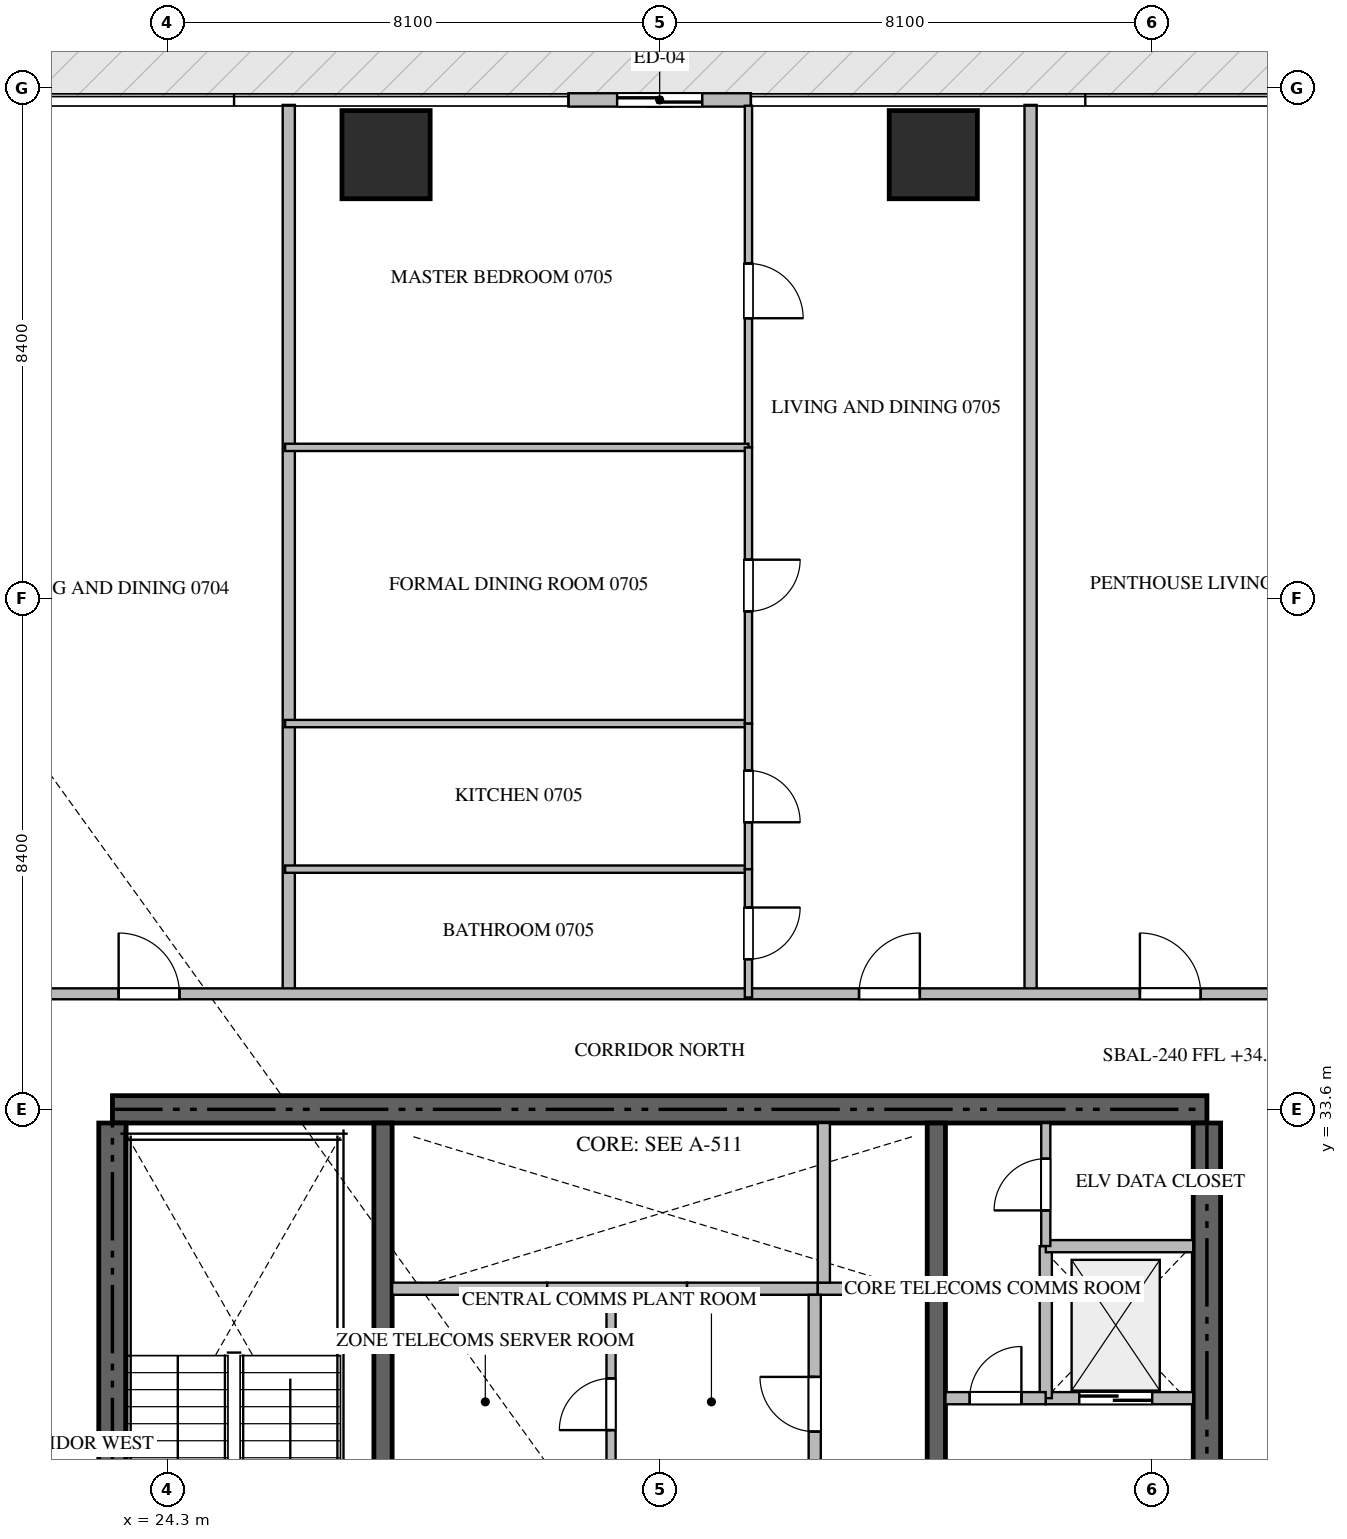
"""IFC4 building model, lengths in metres.
Left out: names, types, materials, properties, quantities, classifications, styles, units other than length and angle.
Written with IfcOpenShell. Run it as: python <this file> out.ifc"""

import sys

from ifc_helpers import new_model, si_unit, direction, frame, frame_2d, origin, origin_2d, place, context, subcontext, project, spatial, rectangle, extrude, source, transform, mapped, element, fill, save


model = new_model("IFC4")
c1 = context("Model", 3, precision=1e-05, world=origin(), true_north=direction((0.0, 1.0)))
c2 = subcontext(c1, "Body", "Model", "MODEL_VIEW")
j1 = project(units=[si_unit("LENGTHUNIT", "METRE"), si_unit("PLANEANGLEUNIT", "RADIAN")], contexts=[c1])
p1 = place(None, origin())
s1 = spatial("IfcSite", under=j1, at=p1, CompositionType="ELEMENT")
p2 = place(p1, origin())
s2 = spatial("IfcBuilding", under=s1, at=p2, CompositionType="ELEMENT")
p3 = place(p2, frame((0.0, 0.0, 34.2)))
s3 = spatial("IfcBuildingStorey", under=s2, at=p3, CompositionType="ELEMENT", Elevation=34.2)
p4 = place(p3, frame((41.4, 33.6, -0.26), z_axis=(0.0, 0.0, 1.0), x_axis=(-1.0, 0.0, 0.0)))
e1 = element("IfcWall", 1, at=p4, inside=s3, PredefinedType="SHEAR", context=c2, shape_type="SweptSolid", body=[
    extrude(rectangle(XDim=18.0, YDim=0.45, at=frame_2d((9.0, 0.0))), origin(), (0.0, 0.0, 1.0), 3.748),
])
p5 = place(p3, frame((23.4, 24.25, -0.26), z_axis=(0.0, 0.0, 1.0), x_axis=(0.0, 1.0, 0.0)))
e2 = element("IfcWall", 2, at=p5, inside=s3, PredefinedType="SHEAR", context=c2, shape_type="SweptSolid", body=[
    extrude(rectangle(XDim=9.125, YDim=0.45, at=frame_2d((4.562, 0.0))), origin(), (0.0, 0.0, 1.0), 3.748),
])
p6 = place(p3, frame((41.4, 27.75, -0.26), z_axis=(0.0, 0.0, 1.0), x_axis=(0.0, 1.0, 0.0)))
e3 = element("IfcWall", 3, at=p6, inside=s3, PredefinedType="SHEAR", context=c2, shape_type="SweptSolid", body=[
    extrude(rectangle(XDim=5.625, YDim=0.45, at=frame_2d((2.812, 0.0))), origin(), (0.0, 0.0, 1.0), 3.748),
])
p7 = place(p3, frame((27.85, 23.55, -0.26), z_axis=(0.0, 0.0, 1.0), x_axis=(0.0, 1.0, 0.0)))
e4 = element("IfcWall", 4, at=p7, inside=s3, PredefinedType="SHEAR", context=c2, shape_type="SweptSolid", body=[
    extrude(rectangle(XDim=9.825, YDim=0.3, at=frame_2d((4.913, 0.0))), origin(), (0.0, 0.0, 1.0), 3.748),
])
p8 = place(p3, frame((36.95, 27.05, -0.26), z_axis=(0.0, 0.0, 1.0), x_axis=(0.0, 1.0, 0.0)))
e5 = element("IfcWall", 5, at=p8, inside=s3, PredefinedType="SHEAR", context=c2, shape_type="SweptSolid", body=[
    extrude(rectangle(XDim=6.325, YDim=0.3, at=frame_2d((3.163, 0.0))), origin(), (0.0, 0.0, 1.0), 3.748),
])
m1 = source(origin(), c2, "Body", "SweptSolid", [
    extrude(rectangle(XDim=1.45, YDim=1.45, at=origin_2d()), origin(), (0.0, 0.0, 1.0), 3.75),
])
for number, where, z_axis, x_axis in (
    (6, (27.9, 49.3, -0.26), (0.0, 0.0, 1.0), (1.0, 0.0, 0.0)),
    (7, (36.9, 49.3, -0.26), (0.0, 0.0, 1.0), (1.0, 0.0, 0.0)),
):
    element("IfcColumn", number, at=place(p3, frame(where, z_axis=z_axis, x_axis=x_axis)), inside=s3, PredefinedType="COLUMN", context=c2, shape_type="MappedRepresentation", body=[
        mapped(m1, transform((0.0, 0.0, 0.0), scale=1.0)),
    ])
p9 = place(p3, frame((33.9, 50.2, 0.0), z_axis=(0.0, 0.0, 1.0), x_axis=(-1.0, 0.0, 0.0)))
e8 = element("IfcWall", 8, at=p9, inside=s3, PredefinedType="ELEMENTEDWALL", context=c2, shape_type="SweptSolid", body=[
    extrude(rectangle(XDim=3.0, YDim=0.22, at=frame_2d((1.5, 0.0))), origin(), (0.0, 0.0, 1.0), 3.475),
])
p10 = place(p9, frame((0.8, 0.0, 0.0)))
e9 = element("IfcOpeningElement", 9, at=p10, cuts=e8, PredefinedType="OPENING", context=c2, shape_type="SweptSolid", body=[
    extrude(rectangle(XDim=1.4, YDim=2.25, at=frame_2d((0.7, 1.125))), frame((0.0, 0.12, 0.0), z_axis=(0.0, -1.0, 0.0), x_axis=(1.0, 0.0, 0.0)), (0.0, 0.0, 1.0), 0.24),
])
p11 = place(p3, frame((38.75, 28.85, 0.0), z_axis=(0.0, 0.0, 1.0), x_axis=(1.0, 0.0, 0.0)))
e10 = element("IfcWall", 10, at=p11, inside=s3, PredefinedType="STANDARD", context=c2, shape_type="SweptSolid", body=[
    extrude(rectangle(XDim=2.425, YDim=0.2, at=frame_2d((1.212, 0.0))), origin(), (0.0, 0.0, 1.0), 3.49),
])
p12 = place(p11, frame((0.55, 0.0, 0.0)))
e11 = element("IfcOpeningElement", 11, at=p12, cuts=e10, PredefinedType="OPENING", context=c2, shape_type="SweptSolid", body=[
    extrude(rectangle(XDim=1.2, YDim=2.2, at=frame_2d((0.6, 1.1))), frame((0.0, 0.11, 0.0), z_axis=(0.0, -1.0, 0.0), x_axis=(1.0, 0.0, 0.0)), (0.0, 0.0, 1.0), 0.22),
])
p13 = place(p3, frame((28.0, 30.65, 0.0), z_axis=(0.0, 0.0, 1.0), x_axis=(1.0, 0.0, 0.0)))
e12 = element("IfcWall", 12, at=p13, inside=s3, PredefinedType="STANDARD", context=c2, shape_type="SweptSolid", body=[
    extrude(rectangle(XDim=2.55, YDim=0.2, at=frame_2d((1.275, 0.0))), origin(), (0.0, 0.0, 1.0), 3.49),
])
p14 = place(p3, frame((30.55, 30.65, 0.0), z_axis=(0.0, 0.0, 1.0), x_axis=(1.0, 0.0, 0.0)))
e13 = element("IfcWall", 13, at=p14, inside=s3, PredefinedType="STANDARD", context=c2, shape_type="SweptSolid", body=[
    extrude(rectangle(XDim=2.3, YDim=0.2, at=frame_2d((1.15, 0.0))), origin(), (0.0, 0.0, 1.0), 3.49),
])
p15 = place(p3, frame((32.85, 30.65, 0.0), z_axis=(0.0, 0.0, 1.0), x_axis=(1.0, 0.0, 0.0)))
e14 = element("IfcWall", 14, at=p15, inside=s3, PredefinedType="STANDARD", context=c2, shape_type="SweptSolid", body=[
    extrude(rectangle(XDim=2.15, YDim=0.2, at=frame_2d((1.075, 0.0))), origin(), (0.0, 0.0, 1.0), 3.49),
])
p16 = place(p3, frame((35.0, 30.65, 0.0), z_axis=(0.0, 0.0, 1.0), x_axis=(1.0, 0.0, 0.0)))
e15 = element("IfcWall", 15, at=p16, inside=s3, PredefinedType="STANDARD", context=c2, shape_type="SweptSolid", body=[
    extrude(rectangle(XDim=1.8, YDim=0.2, at=frame_2d((0.9, 0.0))), origin(), (0.0, 0.0, 1.0), 3.49),
])
p17 = place(p3, frame((35.1, 30.75, 0.0), z_axis=(0.0, 0.0, 1.0), x_axis=(0.0, 1.0, 0.0)))
e16 = element("IfcWall", 16, at=p17, inside=s3, PredefinedType="STANDARD", context=c2, shape_type="SweptSolid", body=[
    extrude(rectangle(XDim=2.625, YDim=0.2, at=frame_2d((1.312, 0.0))), origin(), (0.0, 0.0, 1.0), 3.49),
])
p18 = place(p3, frame((38.75, 28.85, 0.0), z_axis=(0.0, 0.0, 1.0), x_axis=(0.0, 1.0, 0.0)))
e17 = element("IfcWall", 17, at=p18, inside=s3, PredefinedType="STANDARD", context=c2, shape_type="SweptSolid", body=[
    extrude(rectangle(XDim=2.5, YDim=0.2, at=frame_2d((1.25, 0.0))), origin(), (0.0, 0.0, 1.0), 3.49),
])
p19 = place(p3, frame((38.75, 31.35, 0.0), z_axis=(0.0, 0.0, 1.0), x_axis=(1.0, 0.0, 0.0)))
e18 = element("IfcWall", 18, at=p19, inside=s3, PredefinedType="STANDARD", context=c2, shape_type="SweptSolid", body=[
    extrude(rectangle(XDim=2.425, YDim=0.2, at=frame_2d((1.212, 0.0))), origin(), (0.0, 0.0, 1.0), 3.49),
])
p20 = place(p3, frame((37.1, 28.85, 0.0), z_axis=(0.0, 0.0, 1.0), x_axis=(1.0, 0.0, 0.0)))
e19 = element("IfcWall", 19, at=p20, inside=s3, PredefinedType="STANDARD", context=c2, shape_type="SweptSolid", body=[
    extrude(rectangle(XDim=1.648, YDim=0.2, at=frame_2d((0.824, 0.0))), origin(), (0.0, 0.0, 1.0), 3.49),
])
p21 = place(p20, frame((0.399, 0.0, 0.0)))
e20 = element("IfcOpeningElement", 20, at=p21, cuts=e19, PredefinedType="OPENING", context=c2, shape_type="SweptSolid", body=[
    extrude(rectangle(XDim=0.85, YDim=2.1, at=frame_2d((0.425, 1.05))), frame((0.0, 0.11, 0.0), z_axis=(0.0, -1.0, 0.0), x_axis=(1.0, 0.0, 0.0)), (0.0, 0.0, 1.0), 0.22),
])
p22 = place(p3, frame((38.75, 31.352, 0.0), z_axis=(0.0, 0.0, 1.0), x_axis=(0.0, 1.0, 0.0)))
e21 = element("IfcWall", 21, at=p22, inside=s3, PredefinedType="PARTITIONING", context=c2, shape_type="SweptSolid", body=[
    extrude(rectangle(XDim=2.023, YDim=0.15, at=frame_2d((1.011, 0.0))), origin(), (0.0, 0.0, 1.0), 3.49),
])
p23 = place(p22, frame((0.586, 0.0, 0.0)))
e22 = element("IfcOpeningElement", 22, at=p23, cuts=e21, PredefinedType="OPENING", context=c2, shape_type="SweptSolid", body=[
    extrude(rectangle(XDim=0.85, YDim=2.1, at=frame_2d((0.425, 1.05))), frame((0.0, 0.085, 0.0), z_axis=(0.0, -1.0, 0.0), x_axis=(1.0, 0.0, 0.0)), (0.0, 0.0, 1.0), 0.17),
])
p24 = place(p3, frame((34.95, 26.95, 0.0), z_axis=(0.0, 0.0, 1.0), x_axis=(0.0, 1.0, 0.0)))
e23 = element("IfcWall", 23, at=p24, inside=s3, PredefinedType="STANDARD", context=c2, shape_type="SweptSolid", body=[
    extrude(rectangle(XDim=3.6, YDim=0.2, at=frame_2d((1.8, 0.0))), origin(), (0.0, 0.0, 1.0), 3.49),
])
p25 = place(p24, frame((1.35, 0.0, 0.0)))
e24 = element("IfcOpeningElement", 24, at=p25, cuts=e23, PredefinedType="OPENING", context=c2, shape_type="SweptSolid", body=[
    extrude(rectangle(XDim=0.9, YDim=2.1, at=frame_2d((0.45, 1.05))), frame((0.0, 0.11, 0.0), z_axis=(0.0, -1.0, 0.0), x_axis=(1.0, 0.0, 0.0)), (0.0, 0.0, 1.0), 0.22),
])
p26 = place(p3, frame((31.6, 26.95, 0.0), z_axis=(0.0, 0.0, 1.0), x_axis=(0.0, 1.0, 0.0)))
e25 = element("IfcWall", 25, at=p26, inside=s3, PredefinedType="PARTITIONING", context=c2, shape_type="SweptSolid", body=[
    extrude(rectangle(XDim=3.6, YDim=0.15, at=frame_2d((1.8, 0.0))), origin(), (0.0, 0.0, 1.0), 3.49),
])
p27 = place(p26, frame((1.375, 0.0, 0.0)))
e26 = element("IfcOpeningElement", 26, at=p27, cuts=e25, PredefinedType="OPENING", context=c2, shape_type="SweptSolid", body=[
    extrude(rectangle(XDim=0.85, YDim=2.1, at=frame_2d((0.425, 1.05))), frame((0.0, 0.085, 0.0), z_axis=(0.0, -1.0, 0.0), x_axis=(1.0, 0.0, 0.0)), (0.0, 0.0, 1.0), 0.17),
])
for number, where, z_axis, x_axis in (
    (27, (26.3, 35.5, 0.0), (0.0, 0.0, 1.0), (0.0, 1.0, 0.0)),
    (28, (38.5, 35.5, 0.0), (0.0, 0.0, 1.0), (0.0, 1.0, 0.0)),
):
    element("IfcWall", number, at=place(p3, frame(where, z_axis=z_axis, x_axis=x_axis)), inside=s3, PredefinedType="PARTITIONING", context=c2, shape_type="SweptSolid", body=[
        extrude(rectangle(XDim=14.618, YDim=0.2, at=frame_2d((7.309, 0.0))), origin(), (0.0, 0.0, 1.0), 3.49),
    ])
p28 = place(p3, frame((21.402, 35.5, 0.0), z_axis=(0.0, 0.0, 1.0), x_axis=(1.0, 0.0, 0.0)))
e29 = element("IfcWall", 29, at=p28, inside=s3, PredefinedType="PARTITIONING", context=c2, shape_type="SweptSolid", body=[
    extrude(rectangle(XDim=21.996, YDim=0.18, at=frame_2d((10.998, 0.0))), origin(), (0.0, 0.0, 1.0), 3.49),
])
p29 = place(p28, frame((2.1, 0.0, 0.0)))
e30 = element("IfcOpeningElement", 30, at=p29, cuts=e29, PredefinedType="OPENING", context=c2, shape_type="SweptSolid", body=[
    extrude(rectangle(XDim=1.0, YDim=2.15, at=frame_2d((0.5, 1.075))), frame((0.0, 0.1, 0.0), z_axis=(0.0, -1.0, 0.0), x_axis=(1.0, 0.0, 0.0)), (0.0, 0.0, 1.0), 0.2),
])
p30 = place(p28, frame((14.277, 0.0, 0.0)))
e31 = element("IfcOpeningElement", 31, at=p30, cuts=e29, PredefinedType="OPENING", context=c2, shape_type="SweptSolid", body=[
    extrude(rectangle(XDim=1.0, YDim=2.15, at=frame_2d((0.5, 1.075))), frame((0.0, 0.1, 0.0), z_axis=(0.0, -1.0, 0.0), x_axis=(1.0, 0.0, 0.0)), (0.0, 0.0, 1.0), 0.2),
])
p31 = place(p28, frame((18.896, 0.0, 0.0)))
e32 = element("IfcOpeningElement", 32, at=p31, cuts=e29, PredefinedType="OPENING", context=c2, shape_type="SweptSolid", body=[
    extrude(rectangle(XDim=1.0, YDim=2.15, at=frame_2d((0.5, 1.075))), frame((0.0, 0.1, 0.0), z_axis=(0.0, -1.0, 0.0), x_axis=(1.0, 0.0, 0.0)), (0.0, 0.0, 1.0), 0.2),
])
p32 = place(p3, frame((33.86, 50.105, 0.0), z_axis=(0.0, 0.0, 1.0), x_axis=(0.0, -1.0, 0.0)))
e33 = element("IfcWall", 33, at=p32, inside=s3, PredefinedType="PARTITIONING", context=c2, shape_type="SweptSolid", body=[
    extrude(rectangle(XDim=5.619, YDim=0.12, at=frame_2d((2.81, 0.0))), origin(), (0.0, 0.0, 1.0), 3.49),
])
p33 = place(p32, frame((2.595, 0.0, 0.0)))
e34 = element("IfcOpeningElement", 34, at=p33, cuts=e33, PredefinedType="OPENING", context=c2, shape_type="SweptSolid", body=[
    extrude(rectangle(XDim=0.9, YDim=2.1, at=frame_2d((0.45, 1.05))), frame((0.0, 0.07, 0.0), z_axis=(0.0, -1.0, 0.0), x_axis=(1.0, 0.0, 0.0)), (0.0, 0.0, 1.0), 0.14),
])
for number, where, z_axis, x_axis in (
    (35, (26.24, 44.486, 0.0), (0.0, 0.0, 1.0), (1.0, 0.0, 0.0)),
    (36, (26.24, 39.944, 0.0), (0.0, 0.0, 1.0), (1.0, 0.0, 0.0)),
    (37, (26.24, 37.55, 0.0), (0.0, 0.0, 1.0), (1.0, 0.0, 0.0)),
):
    element("IfcWall", number, at=place(p3, frame(where, z_axis=z_axis, x_axis=x_axis)), inside=s3, PredefinedType="PARTITIONING", context=c2, shape_type="SweptSolid", body=[
        extrude(rectangle(XDim=7.62, YDim=0.12, at=frame_2d((3.81, 0.0))), origin(), (0.0, 0.0, 1.0), 3.49),
    ])
p34 = place(p3, frame((33.86, 44.484, 0.0), z_axis=(0.0, 0.0, 1.0), x_axis=(0.0, -1.0, 0.0)))
e38 = element("IfcWall", 38, at=p34, inside=s3, PredefinedType="PARTITIONING", context=c2, shape_type="SweptSolid", body=[
    extrude(rectangle(XDim=4.54, YDim=0.12, at=frame_2d((2.27, 0.0))), origin(), (0.0, 0.0, 1.0), 3.49),
])
p35 = place(p34, frame((1.845, 0.0, 0.0)))
e39 = element("IfcOpeningElement", 39, at=p35, cuts=e38, PredefinedType="OPENING", context=c2, shape_type="SweptSolid", body=[
    extrude(rectangle(XDim=0.85, YDim=2.1, at=frame_2d((0.425, 1.05))), frame((0.0, 0.07, 0.0), z_axis=(0.0, -1.0, 0.0), x_axis=(1.0, 0.0, 0.0)), (0.0, 0.0, 1.0), 0.14),
])
p36 = place(p3, frame((33.86, 39.942, 0.0), z_axis=(0.0, 0.0, 1.0), x_axis=(0.0, -1.0, 0.0)))
e40 = element("IfcWall", 40, at=p36, inside=s3, PredefinedType="PARTITIONING", context=c2, shape_type="SweptSolid", body=[
    extrude(rectangle(XDim=2.392, YDim=0.12, at=frame_2d((1.196, 0.0))), origin(), (0.0, 0.0, 1.0), 3.49),
])
p37 = place(p36, frame((0.771, 0.0, 0.0)))
e41 = element("IfcOpeningElement", 41, at=p37, cuts=e40, PredefinedType="OPENING", context=c2, shape_type="SweptSolid", body=[
    extrude(rectangle(XDim=0.85, YDim=2.1, at=frame_2d((0.425, 1.05))), frame((0.0, 0.07, 0.0), z_axis=(0.0, -1.0, 0.0), x_axis=(1.0, 0.0, 0.0)), (0.0, 0.0, 1.0), 0.14),
])
p38 = place(p3, frame((33.86, 37.548, 0.0), z_axis=(0.0, 0.0, 1.0), x_axis=(0.0, -1.0, 0.0)))
e42 = element("IfcWall", 42, at=p38, inside=s3, PredefinedType="PARTITIONING", context=c2, shape_type="SweptSolid", body=[
    extrude(rectangle(XDim=2.108, YDim=0.12, at=frame_2d((1.054, 0.0))), origin(), (0.0, 0.0, 1.0), 3.49),
])
p39 = place(p38, frame((0.629, 0.0, 0.0)))
e43 = element("IfcOpeningElement", 43, at=p39, cuts=e42, PredefinedType="OPENING", context=c2, shape_type="SweptSolid", body=[
    extrude(rectangle(XDim=0.85, YDim=2.1, at=frame_2d((0.425, 1.05))), frame((0.0, 0.07, 0.0), z_axis=(0.0, -1.0, 0.0), x_axis=(1.0, 0.0, 0.0)), (0.0, 0.0, 1.0), 0.14),
])
m2 = source(origin(), c2, "Body", "SweptSolid", [
    extrude(rectangle(XDim=1.4, YDim=2.25, at=frame_2d((0.7, 1.125))), frame((0.0, 0.025, 0.0), z_axis=(0.0, -1.0, 0.0), x_axis=(1.0, 0.0, 0.0)), (0.0, 0.0, 1.0), 0.05),
])
p40 = place(p10, origin())
e44 = element("IfcDoor", 44, at=p40, inside=s3, OperationType="SLIDING_TO_LEFT", PredefinedType="DOOR", context=c2, shape_type="MappedRepresentation", body=[
    mapped(m2, transform((0.0, 0.0, 0.0), scale=1.0)),
])
fill(e9, e44)
m3 = source(origin(), c2, "Body", "SweptSolid", [
    extrude(rectangle(XDim=1.2, YDim=2.2, at=frame_2d((0.6, 1.1))), frame((0.0, 0.025, 0.0), z_axis=(0.0, -1.0, 0.0), x_axis=(1.0, 0.0, 0.0)), (0.0, 0.0, 1.0), 0.05),
])
p41 = place(p12, origin())
e45 = element("IfcDoor", 45, at=p41, inside=s3, OperationType="DOUBLE_DOOR_SLIDING", PredefinedType="DOOR", context=c2, shape_type="MappedRepresentation", body=[
    mapped(m3, transform((0.0, 0.0, 0.0), scale=1.0)),
])
fill(e11, e45)
m4 = source(origin(), c2, "Body", "SweptSolid", [
    extrude(rectangle(XDim=0.85, YDim=2.1, at=frame_2d((0.425, 1.05))), frame((0.0, 0.025, 0.0), z_axis=(0.0, -1.0, 0.0), x_axis=(1.0, 0.0, 0.0)), (0.0, 0.0, 1.0), 0.05),
])
p42 = place(p21, origin())
e46 = element("IfcDoor", 46, at=p42, inside=s3, OperationType="SINGLE_SWING_RIGHT", PredefinedType="DOOR", context=c2, shape_type="MappedRepresentation", body=[
    mapped(m4, transform((0.0, 0.0, 0.0), scale=1.0)),
])
fill(e20, e46)
p43 = place(p23, origin())
e47 = element("IfcDoor", 47, at=p43, inside=s3, OperationType="SINGLE_SWING_LEFT", PredefinedType="DOOR", context=c2, shape_type="MappedRepresentation", body=[
    mapped(m4, transform((0.0, 0.0, 0.0), scale=1.0)),
])
fill(e22, e47)
m5 = source(origin(), c2, "Body", "SweptSolid", [
    extrude(rectangle(XDim=0.9, YDim=2.1, at=frame_2d((0.45, 1.05))), frame((0.0, 0.025, 0.0), z_axis=(0.0, -1.0, 0.0), x_axis=(1.0, 0.0, 0.0)), (0.0, 0.0, 1.0), 0.05),
])
p44 = place(p25, origin())
e48 = element("IfcDoor", 48, at=p44, inside=s3, OperationType="SINGLE_SWING_RIGHT", PredefinedType="DOOR", context=c2, shape_type="MappedRepresentation", body=[
    mapped(m5, transform((0.0, 0.0, 0.0), scale=1.0)),
])
fill(e24, e48)
p45 = place(p27, origin())
e49 = element("IfcDoor", 49, at=p45, inside=s3, OperationType="SINGLE_SWING_LEFT", PredefinedType="DOOR", context=c2, shape_type="MappedRepresentation", body=[
    mapped(m4, transform((0.0, 0.0, 0.0), scale=1.0)),
])
fill(e26, e49)
m6 = source(origin(), c2, "Body", "SweptSolid", [
    extrude(rectangle(XDim=1.0, YDim=2.15, at=frame_2d((0.5, 1.075))), frame((0.0, 0.025, 0.0), z_axis=(0.0, -1.0, 0.0), x_axis=(1.0, 0.0, 0.0)), (0.0, 0.0, 1.0), 0.05),
])
p46 = place(p29, origin())
e50 = element("IfcDoor", 50, at=p46, inside=s3, OperationType="SINGLE_SWING_LEFT", PredefinedType="DOOR", context=c2, shape_type="MappedRepresentation", body=[
    mapped(m6, transform((0.0, 0.0, 0.0), scale=1.0)),
])
fill(e30, e50)
p47 = place(p30, origin())
e51 = element("IfcDoor", 51, at=p47, inside=s3, OperationType="SINGLE_SWING_RIGHT", PredefinedType="DOOR", context=c2, shape_type="MappedRepresentation", body=[
    mapped(m6, transform((0.0, 0.0, 0.0), scale=1.0)),
])
fill(e31, e51)
p48 = place(p31, origin())
e52 = element("IfcDoor", 52, at=p48, inside=s3, OperationType="SINGLE_SWING_LEFT", PredefinedType="DOOR", context=c2, shape_type="MappedRepresentation", body=[
    mapped(m6, transform((0.0, 0.0, 0.0), scale=1.0)),
])
fill(e32, e52)
p49 = place(p33, origin())
e53 = element("IfcDoor", 53, at=p49, inside=s3, OperationType="SINGLE_SWING_RIGHT", PredefinedType="DOOR", context=c2, shape_type="MappedRepresentation", body=[
    mapped(m5, transform((0.0, 0.0, 0.0), scale=1.0)),
])
fill(e34, e53)
p50 = place(p35, origin())
e54 = element("IfcDoor", 54, at=p50, inside=s3, OperationType="SINGLE_SWING_LEFT", PredefinedType="DOOR", context=c2, shape_type="MappedRepresentation", body=[
    mapped(m4, transform((0.0, 0.0, 0.0), scale=1.0)),
])
fill(e39, e54)
p51 = place(p37, origin())
e55 = element("IfcDoor", 55, at=p51, inside=s3, OperationType="SINGLE_SWING_RIGHT", PredefinedType="DOOR", context=c2, shape_type="MappedRepresentation", body=[
    mapped(m4, transform((0.0, 0.0, 0.0), scale=1.0)),
])
fill(e41, e55)
p52 = place(p39, origin())
e56 = element("IfcDoor", 56, at=p52, inside=s3, OperationType="SINGLE_SWING_LEFT", PredefinedType="DOOR", context=c2, shape_type="MappedRepresentation", body=[
    mapped(m4, transform((0.0, 0.0, 0.0), scale=1.0)),
])
fill(e43, e56)
save(model, sys.argv[1])
